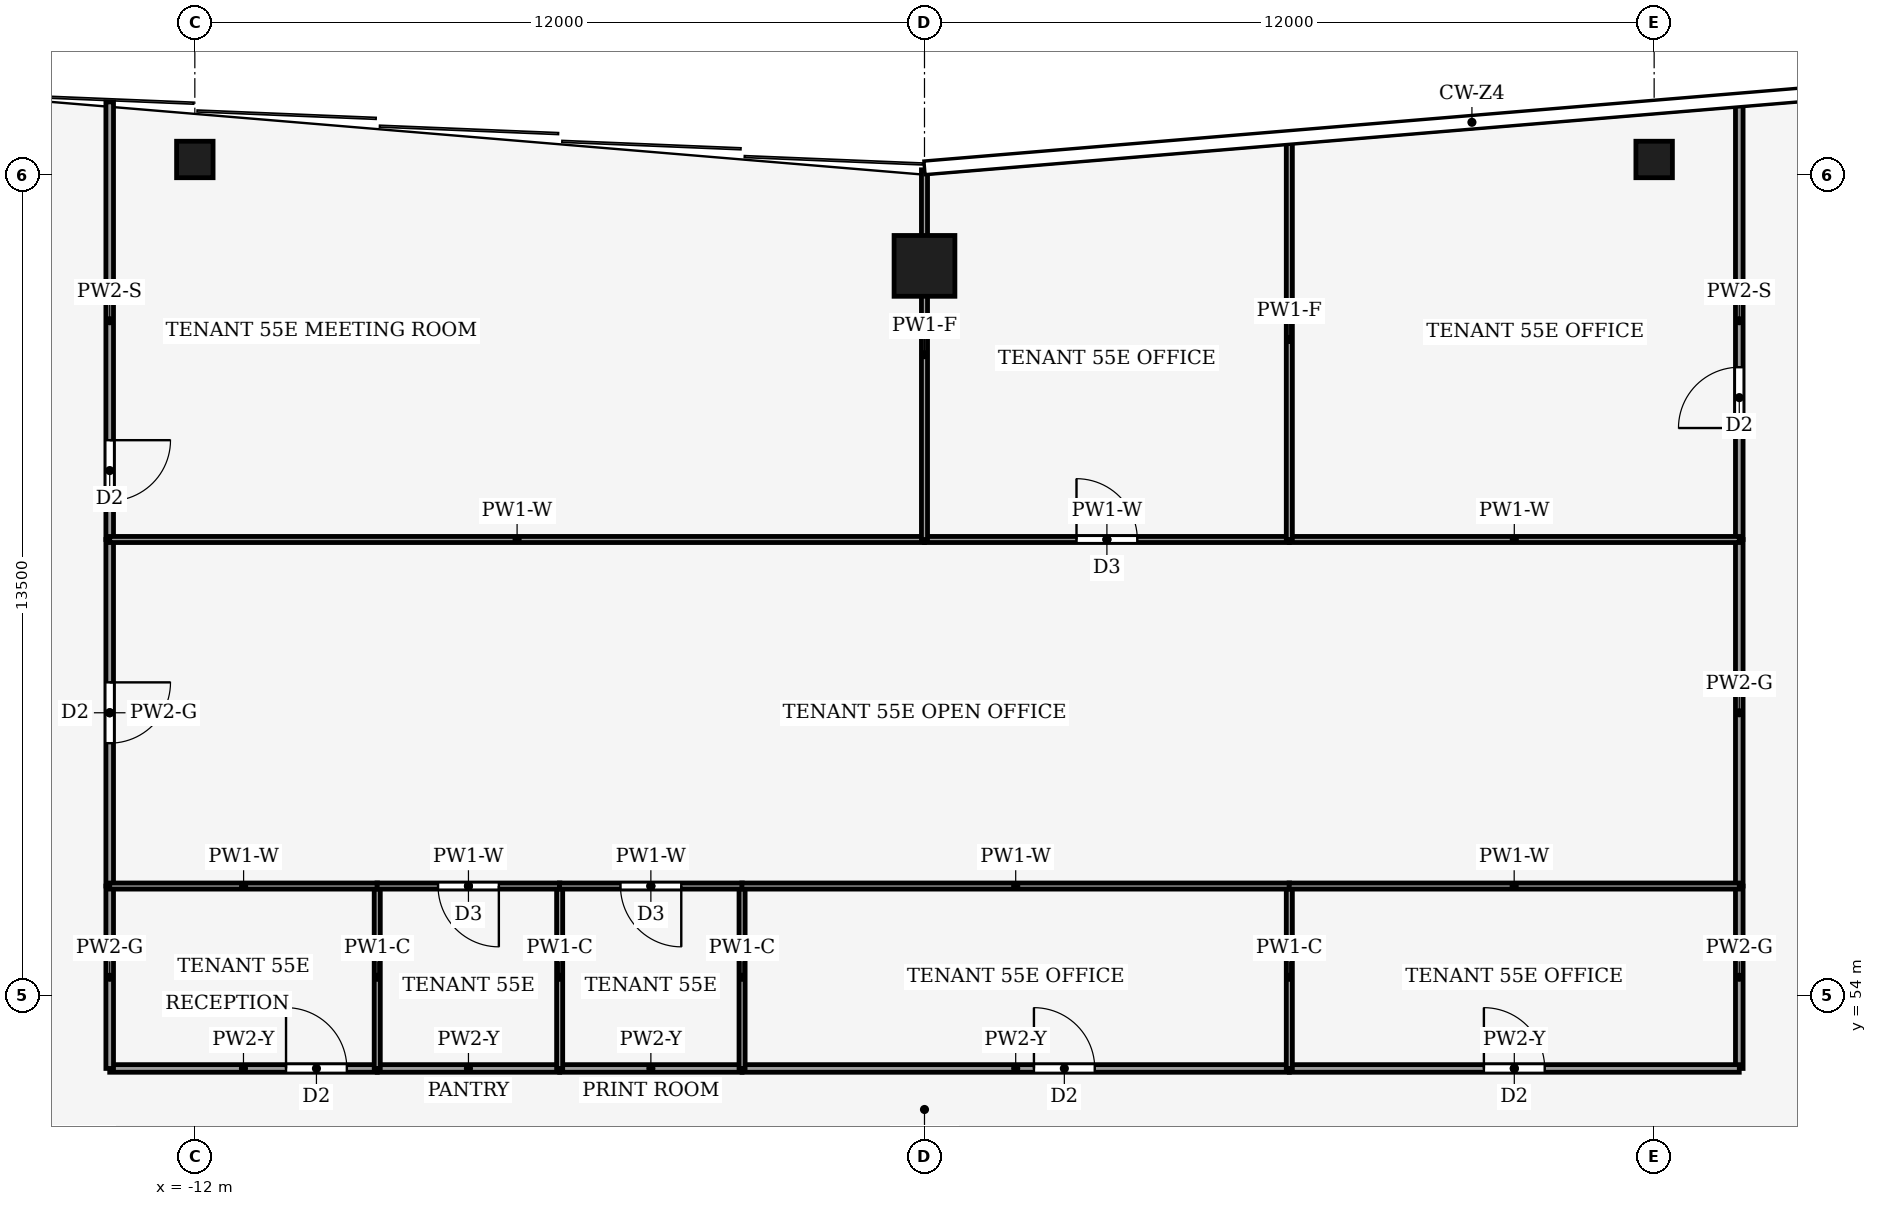
"""IFC4 building model, lengths in metres.
Left out: names, types, materials, properties, quantities, classifications, styles, units other than length and angle.
Written with IfcOpenShell. Run it as: python <this file> out.ifc"""

import sys

from ifc_helpers import new_model, si_unit, direction, frame, frame_2d, origin, origin_2d, place, context, subcontext, project, spatial, rectangle, hollow_rectangle, extrude, element, fill, save


model = new_model("IFC4")
c1 = context("Model", 3, precision=1e-05, world=origin(), true_north=direction((0.0, 1.0)))
c2 = subcontext(c1, "Body", "Model", "MODEL_VIEW")
j1 = project(units=[si_unit("LENGTHUNIT", "METRE"), si_unit("PLANEANGLEUNIT", "RADIAN")], contexts=[c1])
p1 = place(None, origin())
s1 = spatial("IfcSite", under=j1, at=p1, CompositionType="ELEMENT")
p2 = place(p1, origin())
s2 = spatial("IfcBuilding", under=s1, at=p2, CompositionType="ELEMENT")
p3 = place(p2, frame((0.0, 0.0, 242.0)))
s3 = spatial("IfcBuildingStorey", under=s2, at=p3, CompositionType="ELEMENT", Elevation=242.0)
p4 = place(p3, frame((0.0, 66.0, 0.0), z_axis=(0.0, 0.0, 1.0), x_axis=(1.0, 0.0, 0.0)))
e1 = element("IfcColumn", 1, at=p4, inside=s3, PredefinedType="COLUMN", context=c2, shape_type="SweptSolid", body=[
    extrude(hollow_rectangle(XDim=1.0, YDim=1.0, WallThickness=0.045, at=origin_2d()), origin(), (0.0, 0.0, 1.0), 4.0),
])
for number, where, z_axis, x_axis in (
    (2, (-12.0, 67.75, 0.0), (0.0, 0.0, 1.0), (1.0, 0.0, 0.0)),
    (3, (12.0, 67.75, 0.0), (0.0, 0.0, 1.0), (1.0, 0.0, 0.0)),
):
    element("IfcColumn", number, at=place(p3, frame(where, z_axis=z_axis, x_axis=x_axis)), inside=s3, PredefinedType="COLUMN", context=c2, shape_type="SweptSolid", body=[
        extrude(hollow_rectangle(XDim=0.6, YDim=0.6, WallThickness=0.025, at=origin_2d()), origin(), (0.0, 0.0, 1.0), 4.0),
    ])
p5 = place(p3, frame((-13.4, 52.8, 0.0), z_axis=(0.0, 0.0, 1.0), x_axis=(1.0, 0.0, 0.0)))
e4 = element("IfcWall", 4, at=p5, inside=s3, PredefinedType="PARTITIONING", context=c2, shape_type="SweptSolid", body=[
    extrude(rectangle(XDim=4.4, YDim=0.125, at=frame_2d((2.2, 0.0))), origin(), (0.0, 0.0, 1.0), 3.24),
])
p6 = place(p5, frame((2.9, 0.0, 0.0)))
e5 = element("IfcOpeningElement", 5, at=p6, cuts=e4, PredefinedType="OPENING", context=c2, shape_type="SweptSolid", body=[
    extrude(rectangle(XDim=1.0, YDim=2.1, at=frame_2d((0.5, 1.05))), frame((0.0, 0.073, 0.0), z_axis=(0.0, -1.0, 0.0), x_axis=(1.0, 0.0, 0.0)), (0.0, 0.0, 1.0), 0.145),
])
p7 = place(p3, frame((-13.4, 52.8, 0.0), z_axis=(0.0, 0.0, 1.0), x_axis=(0.0, 1.0, 0.0)))
e6 = element("IfcWall", 6, at=p7, inside=s3, PredefinedType="PARTITIONING", context=c2, shape_type="SweptSolid", body=[
    extrude(rectangle(XDim=3.0, YDim=0.125, at=frame_2d((1.5, 0.0))), origin(), (0.0, 0.0, 1.0), 3.87),
])
for number, where, z_axis, x_axis in (
    (7, (-6.0, 52.8, 0.0), (0.0, 0.0, 1.0), (-1.0, 0.0, 0.0)),
    (8, (-3.0, 52.8, 0.0), (0.0, 0.0, 1.0), (-1.0, 0.0, 0.0)),
):
    element("IfcWall", number, at=place(p3, frame(where, z_axis=z_axis, x_axis=x_axis)), inside=s3, PredefinedType="PARTITIONING", context=c2, shape_type="SweptSolid", body=[
        extrude(rectangle(XDim=3.0, YDim=0.125, at=frame_2d((1.5, 0.0))), origin(), (0.0, 0.0, 1.0), 3.24),
    ])
p8 = place(p3, frame((-3.0, 52.8, 0.0), z_axis=(0.0, 0.0, 1.0), x_axis=(1.0, 0.0, 0.0)))
e9 = element("IfcWall", 9, at=p8, inside=s3, PredefinedType="PARTITIONING", context=c2, shape_type="SweptSolid", body=[
    extrude(rectangle(XDim=9.0, YDim=0.125, at=frame_2d((4.5, 0.0))), origin(), (0.0, 0.0, 1.0), 3.24),
])
p9 = place(p8, frame((4.8, 0.0, 0.0)))
e10 = element("IfcOpeningElement", 10, at=p9, cuts=e9, PredefinedType="OPENING", context=c2, shape_type="SweptSolid", body=[
    extrude(rectangle(XDim=1.0, YDim=2.1, at=frame_2d((0.5, 1.05))), frame((0.0, 0.073, 0.0), z_axis=(0.0, -1.0, 0.0), x_axis=(1.0, 0.0, 0.0)), (0.0, 0.0, 1.0), 0.145),
])
p10 = place(p3, frame((13.4, 52.8, 0.0), z_axis=(0.0, 0.0, 1.0), x_axis=(0.0, 1.0, 0.0)))
e11 = element("IfcWall", 11, at=p10, inside=s3, PredefinedType="PARTITIONING", context=c2, shape_type="SweptSolid", body=[
    extrude(rectangle(XDim=3.0, YDim=0.125, at=frame_2d((1.5, 0.0))), origin(), (0.0, 0.0, 1.0), 3.87),
])
p11 = place(p3, frame((6.0, 52.8, 0.0), z_axis=(0.0, 0.0, 1.0), x_axis=(1.0, 0.0, 0.0)))
e12 = element("IfcWall", 12, at=p11, inside=s3, PredefinedType="PARTITIONING", context=c2, shape_type="SweptSolid", body=[
    extrude(rectangle(XDim=7.4, YDim=0.125, at=frame_2d((3.7, 0.0))), origin(), (0.0, 0.0, 1.0), 3.24),
])
p12 = place(p11, frame((3.2, 0.0, 0.0)))
e13 = element("IfcOpeningElement", 13, at=p12, cuts=e12, PredefinedType="OPENING", context=c2, shape_type="SweptSolid", body=[
    extrude(rectangle(XDim=1.0, YDim=2.1, at=frame_2d((0.5, 1.05))), frame((0.0, 0.073, 0.0), z_axis=(0.0, -1.0, 0.0), x_axis=(1.0, 0.0, 0.0)), (0.0, 0.0, 1.0), 0.145),
])
p13 = place(p3, frame((-13.4, 61.5, 0.0), z_axis=(0.0, 0.0, 1.0), x_axis=(0.0, -1.0, 0.0)))
e14 = element("IfcWall", 14, at=p13, inside=s3, PredefinedType="PARTITIONING", context=c2, shape_type="SweptSolid", body=[
    extrude(rectangle(XDim=5.7, YDim=0.125, at=frame_2d((2.85, 0.0))), origin(), (0.0, 0.0, 1.0), 3.87),
])
p14 = place(p13, frame((2.35, 0.0, 0.0)))
e15 = element("IfcOpeningElement", 15, at=p14, cuts=e14, PredefinedType="OPENING", context=c2, shape_type="SweptSolid", body=[
    extrude(rectangle(XDim=1.0, YDim=2.1, at=frame_2d((0.5, 1.05))), frame((0.0, 0.073, 0.0), z_axis=(0.0, -1.0, 0.0), x_axis=(1.0, 0.0, 0.0)), (0.0, 0.0, 1.0), 0.145),
])
p15 = place(p3, frame((13.4, 55.8, 0.0), z_axis=(0.0, 0.0, 1.0), x_axis=(0.0, 1.0, 0.0)))
e16 = element("IfcWall", 16, at=p15, inside=s3, PredefinedType="PARTITIONING", context=c2, shape_type="SweptSolid", body=[
    extrude(rectangle(XDim=5.7, YDim=0.125, at=frame_2d((2.85, 0.0))), origin(), (0.0, 0.0, 1.0), 3.87),
])
p16 = place(p3, frame((-13.4, 68.697, 0.0), z_axis=(0.0, 0.0, 1.0), x_axis=(0.0, -1.0, 0.0)))
e17 = element("IfcWall", 17, at=p16, inside=s3, PredefinedType="PARTITIONING", context=c2, shape_type="SweptSolid", body=[
    extrude(rectangle(XDim=7.197, YDim=0.125, at=frame_2d((3.598, 0.0))), origin(), (0.0, 0.0, 1.0), 3.04),
])
p17 = place(p16, frame((5.563, 0.0, 0.0)))
e18 = element("IfcOpeningElement", 18, at=p17, cuts=e17, PredefinedType="OPENING", context=c2, shape_type="SweptSolid", body=[
    extrude(rectangle(XDim=1.0, YDim=2.1, at=frame_2d((0.5, 1.05))), frame((0.0, 0.073, 0.0), z_axis=(0.0, -1.0, 0.0), x_axis=(1.0, 0.0, 0.0)), (0.0, 0.0, 1.0), 0.145),
])
p18 = place(p3, frame((13.4, 61.5, 0.0), z_axis=(0.0, 0.0, 1.0), x_axis=(0.0, 1.0, 0.0)))
e19 = element("IfcWall", 19, at=p18, inside=s3, PredefinedType="PARTITIONING", context=c2, shape_type="SweptSolid", body=[
    extrude(rectangle(XDim=7.197, YDim=0.125, at=frame_2d((3.598, 0.0))), origin(), (0.0, 0.0, 1.0), 3.04),
])
p19 = place(p18, frame((1.833, 0.0, 0.0)))
e20 = element("IfcOpeningElement", 20, at=p19, cuts=e19, PredefinedType="OPENING", context=c2, shape_type="SweptSolid", body=[
    extrude(rectangle(XDim=1.0, YDim=2.1, at=frame_2d((0.5, 1.05))), frame((0.0, 0.073, 0.0), z_axis=(0.0, -1.0, 0.0), x_axis=(1.0, 0.0, 0.0)), (0.0, 0.0, 1.0), 0.145),
])
p20 = place(p3, frame((-9.0, 52.8, 0.0), z_axis=(0.0, 0.0, 1.0), x_axis=(0.0, 1.0, 0.0)))
e21 = element("IfcWall", 21, at=p20, inside=s3, PredefinedType="PARTITIONING", context=c2, shape_type="SweptSolid", body=[
    extrude(rectangle(XDim=3.0, YDim=0.1, at=frame_2d((1.5, 0.0))), origin(), (0.0, 0.0, 1.0), 3.87),
])
p21 = place(p3, frame((-8.996, 55.8, 0.0), z_axis=(0.0, 0.0, 1.0), x_axis=(-1.0, 0.0, 0.0)))
e22 = element("IfcWall", 22, at=p21, inside=s3, PredefinedType="PARTITIONING", context=c2, shape_type="SweptSolid", body=[
    extrude(rectangle(XDim=4.404, YDim=0.1, at=frame_2d((2.202, 0.0))), origin(), (0.0, 0.0, 1.0), 3.24),
])
p22 = place(p3, frame((-6.0, 52.8, 0.0), z_axis=(0.0, 0.0, 1.0), x_axis=(0.0, 1.0, 0.0)))
e23 = element("IfcWall", 23, at=p22, inside=s3, PredefinedType="PARTITIONING", context=c2, shape_type="SweptSolid", body=[
    extrude(rectangle(XDim=3.0, YDim=0.1, at=frame_2d((1.5, 0.0))), origin(), (0.0, 0.0, 1.0), 3.87),
])
p23 = place(p3, frame((-5.996, 55.8, 0.0), z_axis=(0.0, 0.0, 1.0), x_axis=(-1.0, 0.0, 0.0)))
e24 = element("IfcWall", 24, at=p23, inside=s3, PredefinedType="PARTITIONING", context=c2, shape_type="SweptSolid", body=[
    extrude(rectangle(XDim=3.008, YDim=0.1, at=frame_2d((1.504, 0.0))), origin(), (0.0, 0.0, 1.0), 3.24),
])
p24 = place(p23, frame((1.004, 0.0, 0.0)))
e25 = element("IfcOpeningElement", 25, at=p24, cuts=e24, PredefinedType="OPENING", context=c2, shape_type="SweptSolid", body=[
    extrude(rectangle(XDim=1.0, YDim=2.1, at=frame_2d((0.5, 1.05))), frame((0.0, 0.06, 0.0), z_axis=(0.0, -1.0, 0.0), x_axis=(1.0, 0.0, 0.0)), (0.0, 0.0, 1.0), 0.12),
])
p25 = place(p3, frame((-3.0, 52.8, 0.0), z_axis=(0.0, 0.0, 1.0), x_axis=(0.0, 1.0, 0.0)))
e26 = element("IfcWall", 26, at=p25, inside=s3, PredefinedType="PARTITIONING", context=c2, shape_type="SweptSolid", body=[
    extrude(rectangle(XDim=3.0, YDim=0.1, at=frame_2d((1.5, 0.0))), origin(), (0.0, 0.0, 1.0), 3.87),
])
p26 = place(p3, frame((-2.996, 55.8, 0.0), z_axis=(0.0, 0.0, 1.0), x_axis=(-1.0, 0.0, 0.0)))
e27 = element("IfcWall", 27, at=p26, inside=s3, PredefinedType="PARTITIONING", context=c2, shape_type="SweptSolid", body=[
    extrude(rectangle(XDim=3.008, YDim=0.1, at=frame_2d((1.504, 0.0))), origin(), (0.0, 0.0, 1.0), 3.24),
])
p27 = place(p26, frame((1.004, 0.0, 0.0)))
e28 = element("IfcOpeningElement", 28, at=p27, cuts=e27, PredefinedType="OPENING", context=c2, shape_type="SweptSolid", body=[
    extrude(rectangle(XDim=1.0, YDim=2.1, at=frame_2d((0.5, 1.05))), frame((0.0, 0.06, 0.0), z_axis=(0.0, -1.0, 0.0), x_axis=(1.0, 0.0, 0.0)), (0.0, 0.0, 1.0), 0.12),
])
p28 = place(p3, frame((6.0, 52.8, 0.0), z_axis=(0.0, 0.0, 1.0), x_axis=(0.0, 1.0, 0.0)))
e29 = element("IfcWall", 29, at=p28, inside=s3, PredefinedType="PARTITIONING", context=c2, shape_type="SweptSolid", body=[
    extrude(rectangle(XDim=3.0, YDim=0.1, at=frame_2d((1.5, 0.0))), origin(), (0.0, 0.0, 1.0), 3.87),
])
p29 = place(p3, frame((6.004, 55.8, 0.0), z_axis=(0.0, 0.0, 1.0), x_axis=(-1.0, 0.0, 0.0)))
e30 = element("IfcWall", 30, at=p29, inside=s3, PredefinedType="PARTITIONING", context=c2, shape_type="SweptSolid", body=[
    extrude(rectangle(XDim=9.008, YDim=0.1, at=frame_2d((4.504, 0.0))), origin(), (0.0, 0.0, 1.0), 3.24),
])
p30 = place(p3, frame((13.4, 55.8, 0.0), z_axis=(0.0, 0.0, 1.0), x_axis=(-1.0, 0.0, 0.0)))
e31 = element("IfcWall", 31, at=p30, inside=s3, PredefinedType="PARTITIONING", context=c2, shape_type="SweptSolid", body=[
    extrude(rectangle(XDim=7.404, YDim=0.1, at=frame_2d((3.702, 0.0))), origin(), (0.0, 0.0, 1.0), 3.24),
])
p31 = place(p3, frame((0.0, 61.5, 0.0), z_axis=(0.0, 0.0, 1.0), x_axis=(-1.0, 0.0, 0.0)))
e32 = element("IfcWall", 32, at=p31, inside=s3, PredefinedType="PARTITIONING", context=c2, shape_type="SweptSolid", body=[
    extrude(rectangle(XDim=13.4, YDim=0.1, at=frame_2d((6.7, 0.0))), origin(), (0.0, 0.0, 1.0), 3.24),
])
p32 = place(p3, frame((0.0, 61.5, 0.0), z_axis=(0.0, 0.0, 1.0), x_axis=(1.0, 0.0, 0.0)))
e33 = element("IfcWall", 33, at=p32, inside=s3, PredefinedType="PARTITIONING", context=c2, shape_type="SweptSolid", body=[
    extrude(rectangle(XDim=6.0, YDim=0.1, at=frame_2d((3.0, 0.0))), origin(), (0.0, 0.0, 1.0), 3.24),
])
p33 = place(p32, frame((2.5, 0.0, 0.0)))
e34 = element("IfcOpeningElement", 34, at=p33, cuts=e33, PredefinedType="OPENING", context=c2, shape_type="SweptSolid", body=[
    extrude(rectangle(XDim=1.0, YDim=2.1, at=frame_2d((0.5, 1.05))), frame((0.0, 0.06, 0.0), z_axis=(0.0, -1.0, 0.0), x_axis=(1.0, 0.0, 0.0)), (0.0, 0.0, 1.0), 0.12),
])
p34 = place(p3, frame((13.4, 61.5, 0.0), z_axis=(0.0, 0.0, 1.0), x_axis=(-1.0, 0.0, 0.0)))
e35 = element("IfcWall", 35, at=p34, inside=s3, PredefinedType="PARTITIONING", context=c2, shape_type="SweptSolid", body=[
    extrude(rectangle(XDim=7.4, YDim=0.1, at=frame_2d((3.7, 0.0))), origin(), (0.0, 0.0, 1.0), 3.24),
])
p35 = place(p3, frame((0.0, 61.5, 0.0), z_axis=(0.0, 0.0, 1.0), x_axis=(0.0, 1.0, 0.0)))
e36 = element("IfcWall", 36, at=p35, inside=s3, PredefinedType="PARTITIONING", context=c2, shape_type="SweptSolid", body=[
    extrude(rectangle(XDim=6.08, YDim=0.1, at=frame_2d((3.04, 0.0))), origin(), (0.0, 0.0, 1.0), 3.04),
])
p36 = place(p3, frame((6.0, 61.5, 0.0), z_axis=(0.0, 0.0, 1.0), x_axis=(0.0, 1.0, 0.0)))
e37 = element("IfcWall", 37, at=p36, inside=s3, PredefinedType="PARTITIONING", context=c2, shape_type="SweptSolid", body=[
    extrude(rectangle(XDim=6.58, YDim=0.1, at=frame_2d((3.29, 0.0))), origin(), (0.0, 0.0, 1.0), 3.04),
])
p37 = place(p6, origin())
e38 = element("IfcDoor", 38, at=p37, inside=s3, OperationType="SINGLE_SWING_RIGHT", PredefinedType="DOOR", context=c2, shape_type="SweptSolid", body=[
    extrude(rectangle(XDim=1.0, YDim=2.1, at=frame_2d((0.5, 1.05))), frame((0.0, 0.025, 0.0), z_axis=(0.0, -1.0, 0.0), x_axis=(1.0, 0.0, 0.0)), (0.0, 0.0, 1.0), 0.05),
])
fill(e5, e38)
p38 = place(p9, origin())
e39 = element("IfcDoor", 39, at=p38, inside=s3, OperationType="SINGLE_SWING_RIGHT", PredefinedType="DOOR", context=c2, shape_type="SweptSolid", body=[
    extrude(rectangle(XDim=1.0, YDim=2.1, at=frame_2d((0.5, 1.05))), frame((0.0, 0.025, 0.0), z_axis=(0.0, -1.0, 0.0), x_axis=(1.0, 0.0, 0.0)), (0.0, 0.0, 1.0), 0.05),
])
fill(e10, e39)
p39 = place(p12, origin())
e40 = element("IfcDoor", 40, at=p39, inside=s3, OperationType="SINGLE_SWING_LEFT", PredefinedType="DOOR", context=c2, shape_type="SweptSolid", body=[
    extrude(rectangle(XDim=1.0, YDim=2.1, at=frame_2d((0.5, 1.05))), frame((0.0, 0.025, 0.0), z_axis=(0.0, -1.0, 0.0), x_axis=(1.0, 0.0, 0.0)), (0.0, 0.0, 1.0), 0.05),
])
fill(e13, e40)
p40 = place(p14, origin())
e41 = element("IfcDoor", 41, at=p40, inside=s3, OperationType="SINGLE_SWING_RIGHT", PredefinedType="DOOR", context=c2, shape_type="SweptSolid", body=[
    extrude(rectangle(XDim=1.0, YDim=2.1, at=frame_2d((0.5, 1.05))), frame((0.0, 0.025, 0.0), z_axis=(0.0, -1.0, 0.0), x_axis=(1.0, 0.0, 0.0)), (0.0, 0.0, 1.0), 0.05),
])
fill(e15, e41)
p41 = place(p17, origin())
e42 = element("IfcDoor", 42, at=p41, inside=s3, OperationType="SINGLE_SWING_RIGHT", PredefinedType="DOOR", context=c2, shape_type="SweptSolid", body=[
    extrude(rectangle(XDim=1.0, YDim=2.1, at=frame_2d((0.5, 1.05))), frame((0.0, 0.025, 0.0), z_axis=(0.0, -1.0, 0.0), x_axis=(1.0, 0.0, 0.0)), (0.0, 0.0, 1.0), 0.05),
])
fill(e18, e42)
p42 = place(p19, origin())
e43 = element("IfcDoor", 43, at=p42, inside=s3, OperationType="SINGLE_SWING_LEFT", PredefinedType="DOOR", context=c2, shape_type="SweptSolid", body=[
    extrude(rectangle(XDim=1.0, YDim=2.1, at=frame_2d((0.5, 1.05))), frame((0.0, 0.025, 0.0), z_axis=(0.0, -1.0, 0.0), x_axis=(1.0, 0.0, 0.0)), (0.0, 0.0, 1.0), 0.05),
])
fill(e20, e43)
p43 = place(p24, origin())
e44 = element("IfcDoor", 44, at=p43, inside=s3, OperationType="SINGLE_SWING_RIGHT", PredefinedType="DOOR", context=c2, shape_type="SweptSolid", body=[
    extrude(rectangle(XDim=1.0, YDim=2.1, at=frame_2d((0.5, 1.05))), frame((0.0, 0.025, 0.0), z_axis=(0.0, -1.0, 0.0), x_axis=(1.0, 0.0, 0.0)), (0.0, 0.0, 1.0), 0.05),
])
fill(e25, e44)
p44 = place(p27, origin())
e45 = element("IfcDoor", 45, at=p44, inside=s3, OperationType="SINGLE_SWING_LEFT", PredefinedType="DOOR", context=c2, shape_type="SweptSolid", body=[
    extrude(rectangle(XDim=1.0, YDim=2.1, at=frame_2d((0.5, 1.05))), frame((0.0, 0.025, 0.0), z_axis=(0.0, -1.0, 0.0), x_axis=(1.0, 0.0, 0.0)), (0.0, 0.0, 1.0), 0.05),
])
fill(e28, e45)
p45 = place(p33, origin())
e46 = element("IfcDoor", 46, at=p45, inside=s3, OperationType="SINGLE_SWING_RIGHT", PredefinedType="DOOR", context=c2, shape_type="SweptSolid", body=[
    extrude(rectangle(XDim=1.0, YDim=2.1, at=frame_2d((0.5, 1.05))), frame((0.0, 0.025, 0.0), z_axis=(0.0, -1.0, 0.0), x_axis=(1.0, 0.0, 0.0)), (0.0, 0.0, 1.0), 0.05),
])
fill(e34, e46)
save(model, sys.argv[1])
